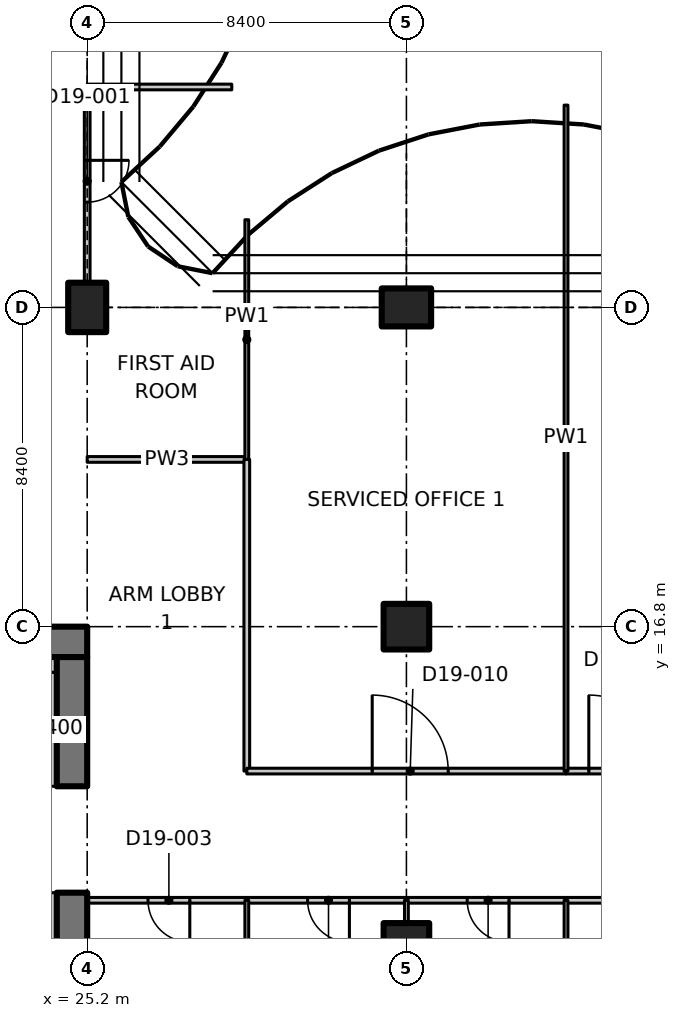
"""IFC4 building model, lengths in metres.
Left out: names, types, materials, properties, quantities, classifications, styles, units other than length and angle.
Written with IfcOpenShell. Run it as: python <this file> out.ifc"""

import sys

from ifc_helpers import new_model, si_unit, direction, frame, frame_2d, origin, origin_2d, place, context, subcontext, project, spatial, polyline, rectangle, outline, extrude, element, fill, save


model = new_model("IFC4")
c1 = context("Model", 3, precision=1e-05, world=origin(), true_north=direction((0.0, 1.0)))
c2 = subcontext(c1, "Body", "Model", "MODEL_VIEW")
j1 = project(units=[si_unit("LENGTHUNIT", "METRE"), si_unit("PLANEANGLEUNIT", "RADIAN")], contexts=[c1])
p1 = place(None, origin())
s1 = spatial("IfcSite", under=j1, at=p1, CompositionType="ELEMENT")
p2 = place(p1, origin())
s2 = spatial("IfcBuilding", under=s1, at=p2, CompositionType="ELEMENT")
p3 = place(p2, frame((0.0, 0.0, 156.5)))
s3 = spatial("IfcBuildingStorey", under=s2, at=p3, CompositionType="ELEMENT", Elevation=156.5)
p4 = place(p3, frame((25.2, 25.2, 0.0), z_axis=(0.0, 0.0, 1.0), x_axis=(1.0, 0.0, 0.0)))
e1 = element("IfcColumn", 1, at=p4, inside=s3, PredefinedType="COLUMN", context=c2, shape_type="SweptSolid", body=[
    extrude(rectangle(XDim=1.0, YDim=1.3, at=origin_2d()), origin(), (0.0, 0.0, 1.0), 5.2),
])
for number, where, z_axis, x_axis in (
    (2, (33.6, 8.4, 0.0), (0.0, 0.0, 1.0), (1.0, 0.0, 0.0)),
    (3, (33.6, 16.8, 0.0), (0.0, 0.0, 1.0), (1.0, 0.0, 0.0)),
):
    element("IfcColumn", number, at=place(p3, frame(where, z_axis=z_axis, x_axis=x_axis)), inside=s3, PredefinedType="COLUMN", context=c2, shape_type="SweptSolid", body=[
        extrude(rectangle(XDim=1.2, YDim=1.2, at=origin_2d()), origin(), (0.0, 0.0, 1.0), 5.2),
    ])
p5 = place(p3, frame((33.6, 25.2, 0.0), z_axis=(0.0, 0.0, 1.0), x_axis=(0.0, 1.0, 0.0)))
e4 = element("IfcColumn", 4, at=p5, inside=s3, PredefinedType="COLUMN", context=c2, shape_type="SweptSolid", body=[
    extrude(rectangle(XDim=1.0, YDim=1.3, at=origin_2d()), origin(), (0.0, 0.0, 1.0), 5.2),
])
p6 = place(p3, frame((23.8, 16.4, 0.0), z_axis=(0.0, 0.0, 1.0), x_axis=(1.0, 0.0, 0.0)))
e5 = element("IfcWall", 5, at=p6, inside=s3, PredefinedType="SHEAR", context=c2, shape_type="SweptSolid", body=[
    extrude(rectangle(XDim=1.4, YDim=0.8, at=frame_2d((0.7, 0.0))), origin(), (0.0, 0.0, 1.0), 5.2),
])
p7 = place(p3, frame((24.8, 0.8, 0.0), z_axis=(0.0, 0.0, 1.0), x_axis=(0.0, 1.0, 0.0)))
e6 = element("IfcWall", 6, at=p7, inside=s3, PredefinedType="SHEAR", context=c2, shape_type="SweptSolid", body=[
    extrude(rectangle(XDim=9.0, YDim=0.8, at=frame_2d((4.5, 0.0))), origin(), (0.0, 0.0, 1.0), 5.2),
])
p8 = place(p3, frame((24.8, 12.6, 0.0), z_axis=(0.0, 0.0, 1.0), x_axis=(0.0, 1.0, 0.0)))
e7 = element("IfcWall", 7, at=p8, inside=s3, PredefinedType="SHEAR", context=c2, shape_type="SweptSolid", body=[
    extrude(rectangle(XDim=3.4, YDim=0.8, at=frame_2d((1.7, 0.0))), origin(), (0.0, 0.0, 1.0), 5.2),
])
p9 = place(p3, frame((24.2, 12.6, 0.0), z_axis=(0.0, 0.0, 1.0), x_axis=(0.0, 1.0, 0.0)))
e8 = element("IfcWall", 8, at=p9, inside=s3, PredefinedType="PARTITIONING", context=c2, shape_type="SweptSolid", body=[
    extrude(rectangle(XDim=3.0, YDim=0.4, at=frame_2d((1.5, 0.0))), origin(), (0.0, 0.0, 1.0), 5.2),
])
p10 = place(p3, frame((23.8, 15.8, 0.0), z_axis=(0.0, 0.0, 1.0), x_axis=(1.0, 0.0, 0.0)))
e9 = element("IfcWall", 9, at=p10, inside=s3, PredefinedType="PARTITIONING", context=c2, shape_type="SweptSolid", body=[
    extrude(rectangle(XDim=0.6, YDim=0.4, at=frame_2d((0.3, 0.0))), origin(), (0.0, 0.0, 1.0), 5.2),
])
p11 = place(p3, frame((24.2, 4.35, 0.0), z_axis=(0.0, 0.0, 1.0), x_axis=(0.0, 1.0, 0.0)))
e10 = element("IfcWall", 10, at=p11, inside=s3, PredefinedType="PARTITIONING", context=c2, shape_type="SweptSolid", body=[
    extrude(rectangle(XDim=5.45, YDim=0.4, at=frame_2d((2.725, 0.0))), origin(), (0.0, 0.0, 1.0), 5.2),
])
p12 = place(p3, frame((25.2, 21.2, 0.0), z_axis=(0.0, 0.0, 1.0), x_axis=(1.0, 0.0, 0.0)))
e11 = element("IfcWall", 11, at=p12, inside=s3, PredefinedType="PARTITIONING", context=c2, shape_type="SweptSolid", body=[
    extrude(rectangle(XDim=4.2, YDim=0.15, at=frame_2d((2.1, 0.0))), origin(), (0.0, 0.0, 1.0), 5.18),
])
p13 = place(p3, frame((29.4, 9.6, 0.0), z_axis=(0.0, 0.0, 1.0), x_axis=(-1.0, 0.0, 0.0)))
e12 = element("IfcWall", 12, at=p13, inside=s3, PredefinedType="PARTITIONING", context=c2, shape_type="SweptSolid", body=[
    extrude(rectangle(XDim=4.2, YDim=0.15, at=frame_2d((2.1, 0.0))), origin(), (0.0, 0.0, 1.0), 5.18),
])
p14 = place(p13, frame((1.5, 0.0, 0.0)))
e13 = element("IfcOpeningElement", 13, at=p14, cuts=e12, PredefinedType="OPENING", context=c2, shape_type="SweptSolid", body=[
    extrude(rectangle(XDim=1.1, YDim=2.1, at=frame_2d((0.55, 1.05))), frame((0.0, 0.085, 0.0), z_axis=(0.0, -1.0, 0.0), x_axis=(1.0, 0.0, 0.0)), (0.0, 0.0, 1.0), 0.17),
])
p15 = place(p3, frame((29.4, 21.2, 0.0), z_axis=(0.0, 0.0, 1.0), x_axis=(0.0, -1.0, 0.0)))
e14 = element("IfcWall", 14, at=p15, inside=s3, PredefinedType="PARTITIONING", context=c2, shape_type="SweptSolid", body=[
    extrude(rectangle(XDim=8.2, YDim=0.15, at=frame_2d((4.1, 0.0))), origin(), (0.0, 0.0, 1.0), 5.18),
])
p16 = place(p3, frame((29.4, 27.507, 0.0), z_axis=(0.0, 0.0, 1.0), x_axis=(0.0, -1.0, 0.0)))
e15 = element("IfcWall", 15, at=p16, inside=s3, PredefinedType="PARTITIONING", context=c2, shape_type="SweptSolid", body=[
    extrude(outline(polyline([(0.0, 0.0), (6.307, 0.0), (6.307, 5.18), (2.757, 5.18), (2.755, 4.83), (1.859, 4.83), (1.857, 5.18), (0.232, 5.18), (0.0, 5.18), (0.0, 0.0)])), frame((0.0, 0.05, 0.0), z_axis=(0.0, -1.0, 0.0), x_axis=(1.0, 0.0, 0.0)), (0.0, 0.0, 1.0), 0.1),
])
p17 = place(p3, frame((25.2, 31.0, 0.0), z_axis=(0.0, 0.0, 1.0), x_axis=(0.0, -1.0, 0.0)))
e16 = element("IfcWall", 16, at=p17, inside=s3, PredefinedType="PARTITIONING", context=c2, shape_type="SweptSolid", body=[
    extrude(outline(polyline([(0.0, 0.0), (5.13, 0.0), (5.13, 4.83), (0.0, 4.83), (0.0, 0.0)])), frame((0.0, 0.075, 0.0), z_axis=(0.0, -1.0, 0.0), x_axis=(1.0, 0.0, 0.0)), (0.0, 0.0, 1.0), 0.15),
])
p18 = place(p17, frame((1.93, 0.0, 0.0)))
e17 = element("IfcOpeningElement", 17, at=p18, cuts=e16, PredefinedType="OPENING", context=c2, shape_type="SweptSolid", body=[
    extrude(rectangle(XDim=1.1, YDim=2.1, at=frame_2d((0.55, 1.05))), frame((0.0, 0.085, 0.0), z_axis=(0.0, -1.0, 0.0), x_axis=(1.0, 0.0, 0.0)), (0.0, 0.0, 1.0), 0.17),
])
p19 = place(p3, frame((25.2, 31.0, 0.0), z_axis=(0.0, 0.0, 1.0), x_axis=(1.0, 0.0, 0.0)))
e18 = element("IfcWall", 18, at=p19, inside=s3, PredefinedType="PARTITIONING", context=c2, shape_type="SweptSolid", body=[
    extrude(rectangle(XDim=3.805, YDim=0.15, at=frame_2d((1.902, 0.0))), origin(), (0.0, 0.0, 1.0), 4.83),
])
p20 = place(p3, frame((33.6, 9.6, 0.0), z_axis=(0.0, 0.0, 1.0), x_axis=(-1.0, 0.0, 0.0)))
e19 = element("IfcWall", 19, at=p20, inside=s3, PredefinedType="PARTITIONING", context=c2, shape_type="SweptSolid", body=[
    extrude(rectangle(XDim=4.2, YDim=0.15, at=frame_2d((2.1, 0.0))), origin(), (0.0, 0.0, 1.0), 5.18),
])
p21 = place(p20, frame((1.5, 0.0, 0.0)))
e20 = element("IfcOpeningElement", 20, at=p21, cuts=e19, PredefinedType="OPENING", context=c2, shape_type="SweptSolid", body=[
    extrude(rectangle(XDim=1.1, YDim=2.1, at=frame_2d((0.55, 1.05))), frame((0.0, 0.085, 0.0), z_axis=(0.0, -1.0, 0.0), x_axis=(1.0, 0.0, 0.0)), (0.0, 0.0, 1.0), 0.17),
])
p22 = place(p3, frame((37.8, 9.6, 0.0), z_axis=(0.0, 0.0, 1.0), x_axis=(-1.0, 0.0, 0.0)))
e21 = element("IfcWall", 21, at=p22, inside=s3, PredefinedType="PARTITIONING", context=c2, shape_type="SweptSolid", body=[
    extrude(rectangle(XDim=4.2, YDim=0.15, at=frame_2d((2.1, 0.0))), origin(), (0.0, 0.0, 1.0), 5.18),
])
p23 = place(p22, frame((1.5, 0.0, 0.0)))
e22 = element("IfcOpeningElement", 22, at=p23, cuts=e21, PredefinedType="OPENING", context=c2, shape_type="SweptSolid", body=[
    extrude(rectangle(XDim=1.1, YDim=2.1, at=frame_2d((0.55, 1.05))), frame((0.0, 0.085, 0.0), z_axis=(0.0, -1.0, 0.0), x_axis=(1.0, 0.0, 0.0)), (0.0, 0.0, 1.0), 0.17),
])
p24 = place(p3, frame((42.0, 9.6, 0.0), z_axis=(0.0, 0.0, 1.0), x_axis=(-1.0, 0.0, 0.0)))
e23 = element("IfcWall", 23, at=p24, inside=s3, PredefinedType="PARTITIONING", context=c2, shape_type="SweptSolid", body=[
    extrude(rectangle(XDim=4.2, YDim=0.15, at=frame_2d((2.1, 0.0))), origin(), (0.0, 0.0, 1.0), 5.18),
])
p25 = place(p24, frame((1.5, 0.0, 0.0)))
e24 = element("IfcOpeningElement", 24, at=p25, cuts=e23, PredefinedType="OPENING", context=c2, shape_type="SweptSolid", body=[
    extrude(rectangle(XDim=1.1, YDim=2.1, at=frame_2d((0.55, 1.05))), frame((0.0, 0.085, 0.0), z_axis=(0.0, -1.0, 0.0), x_axis=(1.0, 0.0, 0.0)), (0.0, 0.0, 1.0), 0.17),
])
p26 = place(p3, frame((29.4, 13.0, 0.0), z_axis=(0.0, 0.0, 1.0), x_axis=(1.0, 0.0, 0.0)))
e25 = element("IfcWall", 25, at=p26, inside=s3, PredefinedType="PARTITIONING", context=c2, shape_type="SweptSolid", body=[
    extrude(rectangle(XDim=8.4, YDim=0.15, at=frame_2d((4.2, 0.0))), origin(), (0.0, 0.0, 1.0), 5.18),
])
p27 = place(p26, frame((3.3, 0.0, 0.0)))
e26 = element("IfcOpeningElement", 26, at=p27, cuts=e25, PredefinedType="OPENING", context=c2, shape_type="SweptSolid", body=[
    extrude(rectangle(XDim=2.0, YDim=2.4, at=frame_2d((1.0, 1.2))), frame((0.0, 0.085, 0.0), z_axis=(0.0, -1.0, 0.0), x_axis=(1.0, 0.0, 0.0)), (0.0, 0.0, 1.0), 0.17),
])
p28 = place(p3, frame((37.8, 13.0, 0.0), z_axis=(0.0, 0.0, 1.0), x_axis=(1.0, 0.0, 0.0)))
e27 = element("IfcWall", 27, at=p28, inside=s3, PredefinedType="PARTITIONING", context=c2, shape_type="SweptSolid", body=[
    extrude(rectangle(XDim=3.4, YDim=0.15, at=frame_2d((1.7, 0.0))), origin(), (0.0, 0.0, 1.0), 5.18),
])
p29 = place(p28, frame((0.6, 0.0, 0.0)))
e28 = element("IfcOpeningElement", 28, at=p29, cuts=e27, PredefinedType="OPENING", context=c2, shape_type="SweptSolid", body=[
    extrude(rectangle(XDim=2.0, YDim=2.4, at=frame_2d((1.0, 1.2))), frame((0.0, 0.085, 0.0), z_axis=(0.0, -1.0, 0.0), x_axis=(1.0, 0.0, 0.0)), (0.0, 0.0, 1.0), 0.17),
])
p30 = place(p3, frame((29.4, 9.6, 0.0), z_axis=(0.0, 0.0, 1.0), x_axis=(0.0, -1.0, 0.0)))
e29 = element("IfcWall", 29, at=p30, inside=s3, PredefinedType="PARTITIONING", context=c2, shape_type="SweptSolid", body=[
    extrude(outline(polyline([(0.0, 0.0), (10.779, 0.0), (10.779, 5.18), (10.7, 5.18), (10.05, 5.18), (10.048, 4.83), (9.152, 4.83), (9.15, 5.18), (0.0, 5.18), (0.0, 0.0)])), frame((0.0, 0.05, 0.0), z_axis=(0.0, -1.0, 0.0), x_axis=(1.0, 0.0, 0.0)), (0.0, 0.0, 1.0), 0.1),
])
p31 = place(p3, frame((33.6, 9.6, 0.0), z_axis=(0.0, 0.0, 1.0), x_axis=(0.0, -1.0, 0.0)))
e30 = element("IfcWall", 30, at=p31, inside=s3, PredefinedType="PARTITIONING", context=c2, shape_type="SweptSolid", body=[
    extrude(rectangle(XDim=0.58, YDim=0.1, at=frame_2d((0.29, 0.0))), origin(), (0.0, 0.0, 1.0), 5.18),
])
p32 = place(p3, frame((37.8, 9.6, 0.0), z_axis=(0.0, 0.0, 1.0), x_axis=(0.0, -1.0, 0.0)))
e31 = element("IfcWall", 31, at=p32, inside=s3, PredefinedType="PARTITIONING", context=c2, shape_type="SweptSolid", body=[
    extrude(outline(polyline([(0.0, 0.0), (10.779, 0.0), (10.779, 5.18), (10.7, 5.18), (10.05, 5.18), (10.048, 4.83), (9.152, 4.83), (9.15, 5.18), (0.0, 5.18), (0.0, 0.0)])), frame((0.0, 0.05, 0.0), z_axis=(0.0, -1.0, 0.0), x_axis=(1.0, 0.0, 0.0)), (0.0, 0.0, 1.0), 0.1),
])
p33 = place(p3, frame((37.8, 30.523, 0.0), z_axis=(0.0, 0.0, 1.0), x_axis=(0.0, -1.0, 0.0)))
e32 = element("IfcWall", 32, at=p33, inside=s3, PredefinedType="PARTITIONING", context=c2, shape_type="SweptSolid", body=[
    extrude(outline(polyline([(0.0, 0.0), (17.523, 0.0), (17.523, 5.18), (5.773, 5.18), (5.771, 4.83), (4.875, 4.83), (4.873, 5.18), (0.28, 5.18), (0.0, 5.18), (0.0, 0.0)])), frame((0.0, 0.05, 0.0), z_axis=(0.0, -1.0, 0.0), x_axis=(1.0, 0.0, 0.0)), (0.0, 0.0, 1.0), 0.1),
])
p34 = place(p18, origin())
e33 = element("IfcDoor", 33, at=p34, inside=s3, OperationType="SINGLE_SWING_RIGHT", PredefinedType="DOOR", context=c2, shape_type="SweptSolid", body=[
    extrude(rectangle(XDim=1.1, YDim=2.1, at=frame_2d((0.55, 1.05))), frame((0.0, 0.025, 0.0), z_axis=(0.0, -1.0, 0.0), x_axis=(1.0, 0.0, 0.0)), (0.0, 0.0, 1.0), 0.05),
])
fill(e17, e33)
p35 = place(p14, origin())
e34 = element("IfcDoor", 34, at=p35, inside=s3, OperationType="SINGLE_SWING_LEFT", PredefinedType="DOOR", context=c2, shape_type="SweptSolid", body=[
    extrude(rectangle(XDim=1.1, YDim=2.1, at=frame_2d((0.55, 1.05))), frame((0.0, 0.025, 0.0), z_axis=(0.0, -1.0, 0.0), x_axis=(1.0, 0.0, 0.0)), (0.0, 0.0, 1.0), 0.05),
])
fill(e13, e34)
p36 = place(p21, origin())
e35 = element("IfcDoor", 35, at=p36, inside=s3, OperationType="SINGLE_SWING_LEFT", PredefinedType="DOOR", context=c2, shape_type="SweptSolid", body=[
    extrude(rectangle(XDim=1.1, YDim=2.1, at=frame_2d((0.55, 1.05))), frame((0.0, 0.025, 0.0), z_axis=(0.0, -1.0, 0.0), x_axis=(1.0, 0.0, 0.0)), (0.0, 0.0, 1.0), 0.05),
])
fill(e20, e35)
p37 = place(p23, origin())
e36 = element("IfcDoor", 36, at=p37, inside=s3, OperationType="SINGLE_SWING_LEFT", PredefinedType="DOOR", context=c2, shape_type="SweptSolid", body=[
    extrude(rectangle(XDim=1.1, YDim=2.1, at=frame_2d((0.55, 1.05))), frame((0.0, 0.025, 0.0), z_axis=(0.0, -1.0, 0.0), x_axis=(1.0, 0.0, 0.0)), (0.0, 0.0, 1.0), 0.05),
])
fill(e22, e36)
p38 = place(p27, origin())
e37 = element("IfcDoor", 37, at=p38, inside=s3, OperationType="DOUBLE_DOOR_SINGLE_SWING", PredefinedType="DOOR", context=c2, shape_type="SweptSolid", body=[
    extrude(rectangle(XDim=2.0, YDim=2.4, at=frame_2d((1.0, 1.2))), frame((0.0, 0.025, 0.0), z_axis=(0.0, -1.0, 0.0), x_axis=(1.0, 0.0, 0.0)), (0.0, 0.0, 1.0), 0.05),
])
fill(e26, e37)
p39 = place(p29, origin())
e38 = element("IfcDoor", 38, at=p39, inside=s3, OperationType="DOUBLE_DOOR_SINGLE_SWING", PredefinedType="DOOR", context=c2, shape_type="SweptSolid", body=[
    extrude(rectangle(XDim=2.0, YDim=2.4, at=frame_2d((1.0, 1.2))), frame((0.0, 0.025, 0.0), z_axis=(0.0, -1.0, 0.0), x_axis=(1.0, 0.0, 0.0)), (0.0, 0.0, 1.0), 0.05),
])
fill(e28, e38)
save(model, sys.argv[1])
